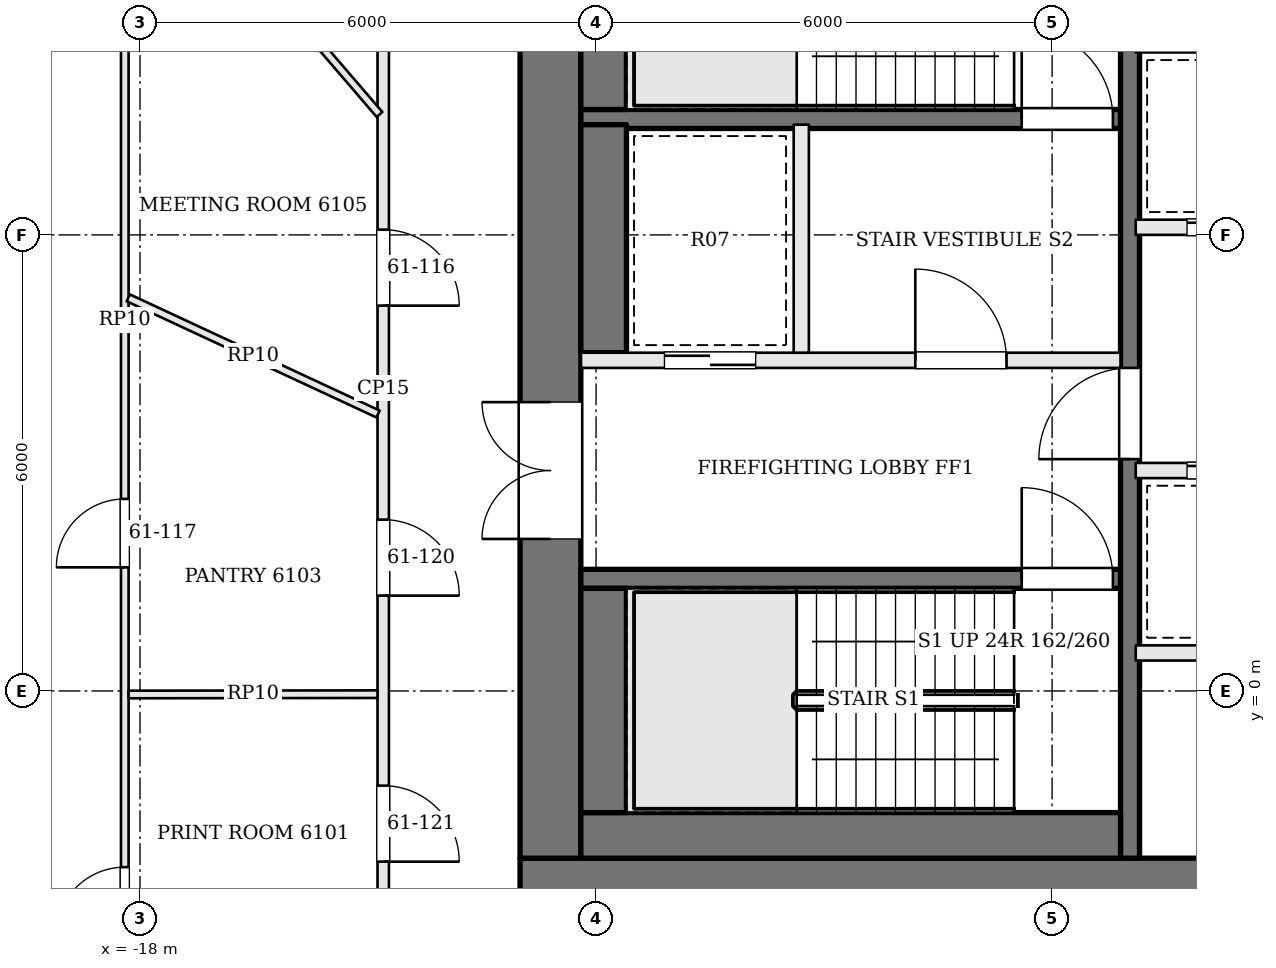
"""IFC4 building model, lengths in metres.
Left out: names, types, materials, properties, quantities, classifications, styles, units other than length and angle.
Written with IfcOpenShell. Run it as: python <this file> out.ifc"""

import sys

from ifc_helpers import new_model, si_unit, direction, frame, frame_2d, origin, place, context, subcontext, project, spatial, rectangle, extrude, element, fill, save


model = new_model("IFC4")
c1 = context("Model", 3, precision=1e-05, world=origin(), true_north=direction((0.0, 1.0)))
c2 = subcontext(c1, "Body", "Model", "MODEL_VIEW")
j1 = project(units=[si_unit("LENGTHUNIT", "METRE"), si_unit("PLANEANGLEUNIT", "RADIAN")], contexts=[c1])
p1 = place(None, origin())
s1 = spatial("IfcSite", under=j1, at=p1, CompositionType="ELEMENT")
p2 = place(p1, origin())
s2 = spatial("IfcBuilding", under=s1, at=p2, CompositionType="ELEMENT")
p3 = place(p2, frame((0.0, 0.0, 248.7)))
s3 = spatial("IfcBuildingStorey", under=s2, at=p3, CompositionType="ELEMENT", Elevation=248.7)
p4 = place(p3, frame((-13.0, -2.6, 0.0), z_axis=(0.0, 0.0, 1.0), x_axis=(1.0, 0.0, 0.0)))
e1 = element("IfcWall", 1, at=p4, inside=s3, PredefinedType="SHEAR", context=c2, shape_type="SweptSolid", body=[
    extrude(rectangle(XDim=26.0, YDim=0.8, at=frame_2d((13.0, 0.0))), origin(), (0.0, 0.0, 1.0), 3.9),
])
p5 = place(p4, frame((9.475, 0.0, 0.0)))
e2 = element("IfcOpeningElement", 2, at=p5, cuts=e1, PredefinedType="OPENING", context=c2, shape_type="SweptSolid", body=[
    extrude(rectangle(XDim=0.9, YDim=2.1, at=frame_2d((0.45, 1.05))), frame((0.0, 0.41, 0.0), z_axis=(0.0, -1.0, 0.0), x_axis=(1.0, 0.0, 0.0)), (0.0, 0.0, 1.0), 0.82),
])
p6 = place(p4, frame((12.75, 0.0, 0.0)))
e3 = element("IfcOpeningElement", 3, at=p6, cuts=e1, PredefinedType="OPENING", context=c2, shape_type="SweptSolid", body=[
    extrude(rectangle(XDim=0.9, YDim=2.1, at=frame_2d((0.45, 1.05))), frame((0.0, 0.41, 0.0), z_axis=(0.0, -1.0, 0.0), x_axis=(1.0, 0.0, 0.0)), (0.0, 0.0, 1.0), 0.82),
])
p7 = place(p4, frame((15.05, 0.0, 0.0)))
e4 = element("IfcOpeningElement", 4, at=p7, cuts=e1, PredefinedType="OPENING", context=c2, shape_type="SweptSolid", body=[
    extrude(rectangle(XDim=1.0, YDim=2.1, at=frame_2d((0.5, 1.05))), frame((0.0, 0.41, 0.0), z_axis=(0.0, -1.0, 0.0), x_axis=(1.0, 0.0, 0.0)), (0.0, 0.0, 1.0), 0.82),
])
p8 = place(p4, frame((16.825, 0.0, 0.0)))
e5 = element("IfcOpeningElement", 5, at=p8, cuts=e1, PredefinedType="OPENING", context=c2, shape_type="SweptSolid", body=[
    extrude(rectangle(XDim=0.7, YDim=2.1, at=frame_2d((0.35, 1.05))), frame((0.0, 0.41, 0.0), z_axis=(0.0, -1.0, 0.0), x_axis=(1.0, 0.0, 0.0)), (0.0, 0.0, 1.0), 0.82),
])
p9 = place(p3, frame((-12.6, -2.2, 0.0), z_axis=(0.0, 0.0, 1.0), x_axis=(0.0, 1.0, 0.0)))
e6 = element("IfcWall", 6, at=p9, inside=s3, PredefinedType="SHEAR", context=c2, shape_type="SweptSolid", body=[
    extrude(rectangle(XDim=13.4, YDim=0.8, at=frame_2d((6.7, 0.0))), origin(), (0.0, 0.0, 1.0), 3.9),
])
p10 = place(p9, frame((4.2, 0.0, 0.0)))
e7 = element("IfcOpeningElement", 7, at=p10, cuts=e6, PredefinedType="OPENING", context=c2, shape_type="SweptSolid", body=[
    extrude(rectangle(XDim=1.8, YDim=2.1, at=frame_2d((0.9, 1.05))), frame((0.0, 0.41, 0.0), z_axis=(0.0, -1.0, 0.0), x_axis=(1.0, 0.0, 0.0)), (0.0, 0.0, 1.0), 0.82),
])
p11 = place(p3, frame((-12.2, 1.475, 0.0), z_axis=(0.0, 0.0, 1.0), x_axis=(1.0, 0.0, 0.0)))
e8 = element("IfcWall", 8, at=p11, inside=s3, PredefinedType="SOLIDWALL", context=c2, shape_type="SweptSolid", body=[
    extrude(rectangle(XDim=7.1, YDim=0.25, at=frame_2d((3.55, 0.0))), origin(), (0.0, 0.0, 1.0), 3.7),
])
p12 = place(p11, frame((5.8, 0.0, 0.0)))
e9 = element("IfcOpeningElement", 9, at=p12, cuts=e8, PredefinedType="OPENING", context=c2, shape_type="SweptSolid", body=[
    extrude(rectangle(XDim=1.2, YDim=2.1, at=frame_2d((0.6, 1.05))), frame((0.0, 0.135, 0.0), z_axis=(0.0, -1.0, 0.0), x_axis=(1.0, 0.0, 0.0)), (0.0, 0.0, 1.0), 0.27),
])
p13 = place(p3, frame((-12.2, 4.35, 0.0), z_axis=(0.0, 0.0, 1.0), x_axis=(1.0, 0.0, 0.0)))
e10 = element("IfcWall", 10, at=p13, inside=s3, PredefinedType="SOLIDWALL", context=c2, shape_type="SweptSolid", body=[
    extrude(rectangle(XDim=7.1, YDim=0.2, at=frame_2d((3.55, 0.0))), origin(), (0.0, 0.0, 1.0), 3.7),
])
p14 = place(p13, frame((4.4, 0.0, 0.0)))
e11 = element("IfcOpeningElement", 11, at=p14, cuts=e10, PredefinedType="OPENING", context=c2, shape_type="SweptSolid", body=[
    extrude(rectangle(XDim=1.2, YDim=2.1, at=frame_2d((0.6, 1.05))), frame((0.0, 0.11, 0.0), z_axis=(0.0, -1.0, 0.0), x_axis=(1.0, 0.0, 0.0)), (0.0, 0.0, 1.0), 0.22),
])
p15 = place(p13, frame((1.1, 0.0, 0.0)))
e12 = element("IfcOpeningElement", 12, at=p15, cuts=e10, PredefinedType="OPENING", context=c2, shape_type="SweptSolid", body=[
    extrude(rectangle(XDim=1.2, YDim=2.1, at=frame_2d((0.6, 1.05))), frame((0.0, 0.11, 0.0), z_axis=(0.0, -1.0, 0.0), x_axis=(1.0, 0.0, 0.0)), (0.0, 0.0, 1.0), 0.22),
])
p16 = place(p3, frame((-12.2, 7.525, 0.0), z_axis=(0.0, 0.0, 1.0), x_axis=(1.0, 0.0, 0.0)))
e13 = element("IfcWall", 13, at=p16, inside=s3, PredefinedType="SOLIDWALL", context=c2, shape_type="SweptSolid", body=[
    extrude(rectangle(XDim=7.1, YDim=0.25, at=frame_2d((3.55, 0.0))), origin(), (0.0, 0.0, 1.0), 3.7),
])
p17 = place(p16, frame((5.8, 0.0, 0.0)))
e14 = element("IfcOpeningElement", 14, at=p17, cuts=e13, PredefinedType="OPENING", context=c2, shape_type="SweptSolid", body=[
    extrude(rectangle(XDim=1.2, YDim=2.1, at=frame_2d((0.6, 1.05))), frame((0.0, 0.135, 0.0), z_axis=(0.0, -1.0, 0.0), x_axis=(1.0, 0.0, 0.0)), (0.0, 0.0, 1.0), 0.27),
])
p18 = place(p3, frame((-9.3, 4.45, 0.0), z_axis=(0.0, 0.0, 1.0), x_axis=(0.0, 1.0, 0.0)))
e15 = element("IfcWall", 15, at=p18, inside=s3, PredefinedType="SOLIDWALL", context=c2, shape_type="SweptSolid", body=[
    extrude(rectangle(XDim=3.0, YDim=0.2, at=frame_2d((1.5, 0.0))), origin(), (0.0, 0.0, 1.0), 3.7),
])
p19 = place(p3, frame((-4.975, -2.2, 0.0), z_axis=(0.0, 0.0, 1.0), x_axis=(0.0, 1.0, 0.0)))
e16 = element("IfcWall", 16, at=p19, inside=s3, PredefinedType="SOLIDWALL", context=c2, shape_type="SweptSolid", body=[
    extrude(rectangle(XDim=13.4, YDim=0.25, at=frame_2d((6.7, 0.0))), origin(), (0.0, 0.0, 1.0), 3.7),
])
p20 = place(p19, frame((5.25, 0.0, 0.0)))
e17 = element("IfcOpeningElement", 17, at=p20, cuts=e16, PredefinedType="OPENING", context=c2, shape_type="SweptSolid", body=[
    extrude(rectangle(XDim=1.2, YDim=2.1, at=frame_2d((0.6, 1.05))), frame((0.0, 0.135, 0.0), z_axis=(0.0, -1.0, 0.0), x_axis=(1.0, 0.0, 0.0)), (0.0, 0.0, 1.0), 0.27),
])
p21 = place(p3, frame((-12.2, -1.9, 0.0), z_axis=(0.0, 0.0, 1.0), x_axis=(1.0, 0.0, 0.0)))
e18 = element("IfcWall", 18, at=p21, inside=s3, PredefinedType="SOLIDWALL", context=c2, shape_type="SweptSolid", body=[
    extrude(rectangle(XDim=7.1, YDim=0.6, at=frame_2d((3.55, 0.0))), origin(), (0.0, 0.0, 1.0), 3.7),
])
p22 = place(p3, frame((-11.9, -1.6, 0.0), z_axis=(0.0, 0.0, 1.0), x_axis=(0.0, 1.0, 0.0)))
e19 = element("IfcWall", 19, at=p22, inside=s3, PredefinedType="SOLIDWALL", context=c2, shape_type="SweptSolid", body=[
    extrude(rectangle(XDim=2.95, YDim=0.6, at=frame_2d((1.475, 0.0))), origin(), (0.0, 0.0, 1.0), 3.7),
])
p23 = place(p3, frame((-11.9, 4.45, 0.0), z_axis=(0.0, 0.0, 1.0), x_axis=(0.0, 1.0, 0.0)))
e20 = element("IfcWall", 20, at=p23, inside=s3, PredefinedType="SOLIDWALL", context=c2, shape_type="SweptSolid", body=[
    extrude(rectangle(XDim=3.0, YDim=0.6, at=frame_2d((1.5, 0.0))), origin(), (0.0, 0.0, 1.0), 3.7),
])
p24 = place(p3, frame((-11.9, 7.65, 0.0), z_axis=(0.0, 0.0, 1.0), x_axis=(0.0, 1.0, 0.0)))
e21 = element("IfcWall", 21, at=p24, inside=s3, PredefinedType="SOLIDWALL", context=c2, shape_type="SweptSolid", body=[
    extrude(rectangle(XDim=2.95, YDim=0.6, at=frame_2d((1.475, 0.0))), origin(), (0.0, 0.0, 1.0), 3.7),
])
p25 = place(p3, frame((-4.9, 0.5, 0.0), z_axis=(0.0, 0.0, 1.0), x_axis=(1.0, 0.0, 0.0)))
e22 = element("IfcWall", 22, at=p25, inside=s3, PredefinedType="SOLIDWALL", context=c2, shape_type="SweptSolid", body=[
    extrude(rectangle(XDim=9.8, YDim=0.2, at=frame_2d((4.9, 0.0))), origin(), (0.0, 0.0, 1.0), 3.7),
])
p26 = place(p3, frame((-4.9, 2.9, 0.0), z_axis=(0.0, 0.0, 1.0), x_axis=(1.0, 0.0, 0.0)))
e23 = element("IfcWall", 23, at=p26, inside=s3, PredefinedType="SOLIDWALL", context=c2, shape_type="SweptSolid", body=[
    extrude(rectangle(XDim=9.8, YDim=0.2, at=frame_2d((4.9, 0.0))), origin(), (0.0, 0.0, 1.0), 3.7),
])
p27 = place(p26, frame((0.675, 0.0, 0.0)))
e24 = element("IfcOpeningElement", 24, at=p27, cuts=e23, PredefinedType="OPENING", context=c2, shape_type="SweptSolid", body=[
    extrude(rectangle(XDim=1.1, YDim=2.1, at=frame_2d((0.55, 1.05))), frame((0.0, 0.11, 0.0), z_axis=(0.0, -1.0, 0.0), x_axis=(1.0, 0.0, 0.0)), (0.0, 0.0, 1.0), 0.22),
])
p28 = place(p26, frame((2.613, 0.0, 0.0)))
e25 = element("IfcOpeningElement", 25, at=p28, cuts=e23, PredefinedType="OPENING", context=c2, shape_type="SweptSolid", body=[
    extrude(rectangle(XDim=0.9, YDim=2.1, at=frame_2d((0.45, 1.05))), frame((0.0, 0.11, 0.0), z_axis=(0.0, -1.0, 0.0), x_axis=(1.0, 0.0, 0.0)), (0.0, 0.0, 1.0), 0.22),
])
p29 = place(p26, frame((4.35, 0.0, 0.0)))
e26 = element("IfcOpeningElement", 26, at=p29, cuts=e23, PredefinedType="OPENING", context=c2, shape_type="SweptSolid", body=[
    extrude(rectangle(XDim=1.1, YDim=2.1, at=frame_2d((0.55, 1.05))), frame((0.0, 0.11, 0.0), z_axis=(0.0, -1.0, 0.0), x_axis=(1.0, 0.0, 0.0)), (0.0, 0.0, 1.0), 0.22),
])
p30 = place(p26, frame((7.463, 0.0, 0.0)))
e27 = element("IfcOpeningElement", 27, at=p30, cuts=e23, PredefinedType="OPENING", context=c2, shape_type="SweptSolid", body=[
    extrude(rectangle(XDim=1.0, YDim=2.1, at=frame_2d((0.5, 1.05))), frame((0.0, 0.11, 0.0), z_axis=(0.0, -1.0, 0.0), x_axis=(1.0, 0.0, 0.0)), (0.0, 0.0, 1.0), 0.22),
])
p31 = place(p3, frame((-4.9, 6.1, 0.0), z_axis=(0.0, 0.0, 1.0), x_axis=(1.0, 0.0, 0.0)))
e28 = element("IfcWall", 28, at=p31, inside=s3, PredefinedType="SOLIDWALL", context=c2, shape_type="SweptSolid", body=[
    extrude(rectangle(XDim=9.8, YDim=0.2, at=frame_2d((4.9, 0.0))), origin(), (0.0, 0.0, 1.0), 3.7),
])
p32 = place(p31, frame((0.675, 0.0, 0.0)))
e29 = element("IfcOpeningElement", 29, at=p32, cuts=e28, PredefinedType="OPENING", context=c2, shape_type="SweptSolid", body=[
    extrude(rectangle(XDim=1.1, YDim=2.1, at=frame_2d((0.55, 1.05))), frame((0.0, 0.11, 0.0), z_axis=(0.0, -1.0, 0.0), x_axis=(1.0, 0.0, 0.0)), (0.0, 0.0, 1.0), 0.22),
])
p33 = place(p31, frame((3.125, 0.0, 0.0)))
e30 = element("IfcOpeningElement", 30, at=p33, cuts=e28, PredefinedType="OPENING", context=c2, shape_type="SweptSolid", body=[
    extrude(rectangle(XDim=1.1, YDim=2.1, at=frame_2d((0.55, 1.05))), frame((0.0, 0.11, 0.0), z_axis=(0.0, -1.0, 0.0), x_axis=(1.0, 0.0, 0.0)), (0.0, 0.0, 1.0), 0.22),
])
p34 = place(p31, frame((5.575, 0.0, 0.0)))
e31 = element("IfcOpeningElement", 31, at=p34, cuts=e28, PredefinedType="OPENING", context=c2, shape_type="SweptSolid", body=[
    extrude(rectangle(XDim=1.1, YDim=2.1, at=frame_2d((0.55, 1.05))), frame((0.0, 0.11, 0.0), z_axis=(0.0, -1.0, 0.0), x_axis=(1.0, 0.0, 0.0)), (0.0, 0.0, 1.0), 0.22),
])
p35 = place(p31, frame((8.025, 0.0, 0.0)))
e32 = element("IfcOpeningElement", 32, at=p35, cuts=e28, PredefinedType="OPENING", context=c2, shape_type="SweptSolid", body=[
    extrude(rectangle(XDim=1.1, YDim=2.1, at=frame_2d((0.55, 1.05))), frame((0.0, 0.11, 0.0), z_axis=(0.0, -1.0, 0.0), x_axis=(1.0, 0.0, 0.0)), (0.0, 0.0, 1.0), 0.22),
])
p36 = place(p3, frame((-14.8, 11.604, 0.0), z_axis=(0.0, 0.0, 1.0), x_axis=(0.0, -1.0, 0.0)))
e33 = element("IfcWall", 33, at=p36, inside=s3, PredefinedType="PARTITIONING", context=c2, shape_type="SweptSolid", body=[
    extrude(rectangle(XDim=15.25, YDim=0.15, at=frame_2d((7.625, 0.0))), origin(), (0.0, 0.0, 1.0), 3.084),
])
p37 = place(p36, frame((1.501, 0.0, 0.0)))
e34 = element("IfcOpeningElement", 34, at=p37, cuts=e33, PredefinedType="OPENING", context=c2, shape_type="SweptSolid", body=[
    extrude(rectangle(XDim=1.0, YDim=2.1, at=frame_2d((0.5, 1.05))), frame((0.0, 0.085, 0.0), z_axis=(0.0, -1.0, 0.0), x_axis=(1.0, 0.0, 0.0)), (0.0, 0.0, 1.0), 0.17),
])
p38 = place(p36, frame((5.535, 0.0, 0.0)))
e35 = element("IfcOpeningElement", 35, at=p38, cuts=e33, PredefinedType="OPENING", context=c2, shape_type="SweptSolid", body=[
    extrude(rectangle(XDim=1.0, YDim=2.4, at=frame_2d((0.5, 1.2))), frame((0.0, 0.085, 0.0), z_axis=(0.0, -1.0, 0.0), x_axis=(1.0, 0.0, 0.0)), (0.0, 0.0, 1.0), 0.17),
])
p39 = place(p36, frame((9.35, 0.0, 0.0)))
e36 = element("IfcOpeningElement", 36, at=p39, cuts=e33, PredefinedType="OPENING", context=c2, shape_type="SweptSolid", body=[
    extrude(rectangle(XDim=1.0, YDim=2.1, at=frame_2d((0.5, 1.05))), frame((0.0, 0.085, 0.0), z_axis=(0.0, -1.0, 0.0), x_axis=(1.0, 0.0, 0.0)), (0.0, 0.0, 1.0), 0.17),
])
p40 = place(p36, frame((12.85, 0.0, 0.0)))
e37 = element("IfcOpeningElement", 37, at=p40, cuts=e33, PredefinedType="OPENING", context=c2, shape_type="SweptSolid", body=[
    extrude(rectangle(XDim=1.0, YDim=2.1, at=frame_2d((0.5, 1.05))), frame((0.0, 0.085, 0.0), z_axis=(0.0, -1.0, 0.0), x_axis=(1.0, 0.0, 0.0)), (0.0, 0.0, 1.0), 0.17),
])
p41 = place(p3, frame((-18.2, -5.081, 0.0), z_axis=(0.0, 0.0, 1.0), x_axis=(0.0, 1.0, 0.0)))
e38 = element("IfcWall", 38, at=p41, inside=s3, PredefinedType="PARTITIONING", context=c2, shape_type="SweptSolid", body=[
    extrude(rectangle(XDim=19.932, YDim=0.1, at=frame_2d((9.966, 0.0))), origin(), (0.0, 0.0, 1.0), 3.084),
])
p42 = place(p41, frame((6.707, 0.0, 0.0)))
e39 = element("IfcOpeningElement", 39, at=p42, cuts=e38, PredefinedType="OPENING", context=c2, shape_type="SweptSolid", body=[
    extrude(rectangle(XDim=0.9, YDim=2.1, at=frame_2d((0.45, 1.05))), frame((0.0, 0.06, 0.0), z_axis=(0.0, -1.0, 0.0), x_axis=(1.0, 0.0, 0.0)), (0.0, 0.0, 1.0), 0.12),
])
p43 = place(p41, frame((1.863, 0.0, 0.0)))
e40 = element("IfcOpeningElement", 40, at=p43, cuts=e38, PredefinedType="OPENING", context=c2, shape_type="SweptSolid", body=[
    extrude(rectangle(XDim=0.9, YDim=2.1, at=frame_2d((0.45, 1.05))), frame((0.0, 0.06, 0.0), z_axis=(0.0, -1.0, 0.0), x_axis=(1.0, 0.0, 0.0)), (0.0, 0.0, 1.0), 0.12),
])
p44 = place(p3, frame((-14.849, 7.584, 0.0), z_axis=(0.0, 0.0, 1.0), x_axis=(-0.65160818205, 0.758555717852, 0.0)))
e41 = element("IfcWall", 41, at=p44, inside=s3, PredefinedType="PARTITIONING", context=c2, shape_type="SweptSolid", body=[
    extrude(rectangle(XDim=5.093, YDim=0.1, at=frame_2d((2.546, 0.0))), origin(), (0.0, 0.0, 1.0), 3.084),
])
p45 = place(p3, frame((-14.868, 3.644, 0.0), z_axis=(0.0, 0.0, 1.0), x_axis=(-0.906769022566, 0.421627726455, 0.0)))
e42 = element("IfcWall", 42, at=p45, inside=s3, PredefinedType="PARTITIONING", context=c2, shape_type="SweptSolid", body=[
    extrude(rectangle(XDim=3.625, YDim=0.1, at=frame_2d((1.812, 0.0))), origin(), (0.0, 0.0, 1.0), 3.084),
])
p46 = place(p3, frame((-14.875, -0.042, 0.0), z_axis=(0.0, 0.0, 1.0), x_axis=(-0.999999196935, -0.00126733162, 0.0)))
e43 = element("IfcWall", 43, at=p46, inside=s3, PredefinedType="PARTITIONING", context=c2, shape_type="SweptSolid", body=[
    extrude(rectangle(XDim=3.275, YDim=0.1, at=frame_2d((1.637, 0.0))), origin(), (0.0, 0.0, 1.0), 3.084),
])
p47 = place(p10, origin())
e44 = element("IfcDoor", 44, at=p47, inside=s3, OperationType="DOUBLE_DOOR_SINGLE_SWING", PredefinedType="DOOR", context=c2, shape_type="SweptSolid", body=[
    extrude(rectangle(XDim=1.8, YDim=2.1, at=frame_2d((0.9, 1.05))), frame((0.0, 0.025, 0.0), z_axis=(0.0, -1.0, 0.0), x_axis=(1.0, 0.0, 0.0)), (0.0, 0.0, 1.0), 0.05),
])
fill(e7, e44)
p48 = place(p20, origin())
e45 = element("IfcDoor", 45, at=p48, inside=s3, OperationType="SINGLE_SWING_LEFT", PredefinedType="DOOR", context=c2, shape_type="SweptSolid", body=[
    extrude(rectangle(XDim=1.2, YDim=2.1, at=frame_2d((0.6, 1.05))), frame((0.0, 0.025, 0.0), z_axis=(0.0, -1.0, 0.0), x_axis=(1.0, 0.0, 0.0)), (0.0, 0.0, 1.0), 0.05),
])
fill(e17, e45)
p49 = place(p14, origin())
e46 = element("IfcDoor", 46, at=p49, inside=s3, OperationType="SINGLE_SWING_LEFT", PredefinedType="DOOR", context=c2, shape_type="SweptSolid", body=[
    extrude(rectangle(XDim=1.2, YDim=2.1, at=frame_2d((0.6, 1.05))), frame((0.0, 0.025, 0.0), z_axis=(0.0, -1.0, 0.0), x_axis=(1.0, 0.0, 0.0)), (0.0, 0.0, 1.0), 0.05),
])
fill(e11, e46)
p50 = place(p12, origin())
e47 = element("IfcDoor", 47, at=p50, inside=s3, OperationType="SINGLE_SWING_LEFT", PredefinedType="DOOR", context=c2, shape_type="SweptSolid", body=[
    extrude(rectangle(XDim=1.2, YDim=2.1, at=frame_2d((0.6, 1.05))), frame((0.0, 0.025, 0.0), z_axis=(0.0, -1.0, 0.0), x_axis=(1.0, 0.0, 0.0)), (0.0, 0.0, 1.0), 0.05),
])
fill(e9, e47)
p51 = place(p17, origin())
e48 = element("IfcDoor", 48, at=p51, inside=s3, OperationType="SINGLE_SWING_LEFT", PredefinedType="DOOR", context=c2, shape_type="SweptSolid", body=[
    extrude(rectangle(XDim=1.2, YDim=2.1, at=frame_2d((0.6, 1.05))), frame((0.0, 0.025, 0.0), z_axis=(0.0, -1.0, 0.0), x_axis=(1.0, 0.0, 0.0)), (0.0, 0.0, 1.0), 0.05),
])
fill(e14, e48)
p52 = place(p15, origin())
e49 = element("IfcDoor", 49, at=p52, inside=s3, OperationType="SLIDING_TO_RIGHT", PredefinedType="DOOR", context=c2, shape_type="SweptSolid", body=[
    extrude(rectangle(XDim=1.2, YDim=2.1, at=frame_2d((0.6, 1.05))), frame((0.0, 0.025, 0.0), z_axis=(0.0, -1.0, 0.0), x_axis=(1.0, 0.0, 0.0)), (0.0, 0.0, 1.0), 0.05),
])
fill(e12, e49)
p53 = place(p27, origin())
e50 = element("IfcDoor", 50, at=p53, inside=s3, OperationType="SLIDING_TO_RIGHT", PredefinedType="DOOR", context=c2, shape_type="SweptSolid", body=[
    extrude(rectangle(XDim=1.1, YDim=2.1, at=frame_2d((0.55, 1.05))), frame((0.0, 0.025, 0.0), z_axis=(0.0, -1.0, 0.0), x_axis=(1.0, 0.0, 0.0)), (0.0, 0.0, 1.0), 0.05),
])
fill(e24, e50)
p54 = place(p32, origin())
e51 = element("IfcDoor", 51, at=p54, inside=s3, OperationType="SLIDING_TO_RIGHT", PredefinedType="DOOR", context=c2, shape_type="SweptSolid", body=[
    extrude(rectangle(XDim=1.1, YDim=2.1, at=frame_2d((0.55, 1.05))), frame((0.0, 0.025, 0.0), z_axis=(0.0, -1.0, 0.0), x_axis=(1.0, 0.0, 0.0)), (0.0, 0.0, 1.0), 0.05),
])
fill(e29, e51)
p55 = place(p38, origin())
e52 = element("IfcDoor", 52, at=p55, inside=s3, OperationType="SINGLE_SWING_RIGHT", PredefinedType="DOOR", context=c2, shape_type="SweptSolid", body=[
    extrude(rectangle(XDim=1.0, YDim=2.4, at=frame_2d((0.5, 1.2))), frame((0.0, 0.025, 0.0), z_axis=(0.0, -1.0, 0.0), x_axis=(1.0, 0.0, 0.0)), (0.0, 0.0, 1.0), 0.05),
])
fill(e35, e52)
p56 = place(p42, origin())
e53 = element("IfcDoor", 53, at=p56, inside=s3, OperationType="SINGLE_SWING_LEFT", PredefinedType="DOOR", context=c2, shape_type="SweptSolid", body=[
    extrude(rectangle(XDim=0.9, YDim=2.1, at=frame_2d((0.45, 1.05))), frame((0.0, 0.025, 0.0), z_axis=(0.0, -1.0, 0.0), x_axis=(1.0, 0.0, 0.0)), (0.0, 0.0, 1.0), 0.05),
])
fill(e39, e53)
p57 = place(p43, origin())
e54 = element("IfcDoor", 54, at=p57, inside=s3, OperationType="SINGLE_SWING_LEFT", PredefinedType="DOOR", context=c2, shape_type="SweptSolid", body=[
    extrude(rectangle(XDim=0.9, YDim=2.1, at=frame_2d((0.45, 1.05))), frame((0.0, 0.025, 0.0), z_axis=(0.0, -1.0, 0.0), x_axis=(1.0, 0.0, 0.0)), (0.0, 0.0, 1.0), 0.05),
])
fill(e40, e54)
p58 = place(p39, origin())
e55 = element("IfcDoor", 55, at=p58, inside=s3, OperationType="SINGLE_SWING_RIGHT", PredefinedType="DOOR", context=c2, shape_type="SweptSolid", body=[
    extrude(rectangle(XDim=1.0, YDim=2.1, at=frame_2d((0.5, 1.05))), frame((0.0, 0.025, 0.0), z_axis=(0.0, -1.0, 0.0), x_axis=(1.0, 0.0, 0.0)), (0.0, 0.0, 1.0), 0.05),
])
fill(e36, e55)
p59 = place(p40, origin())
e56 = element("IfcDoor", 56, at=p59, inside=s3, OperationType="SINGLE_SWING_RIGHT", PredefinedType="DOOR", context=c2, shape_type="SweptSolid", body=[
    extrude(rectangle(XDim=1.0, YDim=2.1, at=frame_2d((0.5, 1.05))), frame((0.0, 0.025, 0.0), z_axis=(0.0, -1.0, 0.0), x_axis=(1.0, 0.0, 0.0)), (0.0, 0.0, 1.0), 0.05),
])
fill(e37, e56)
save(model, sys.argv[1])
